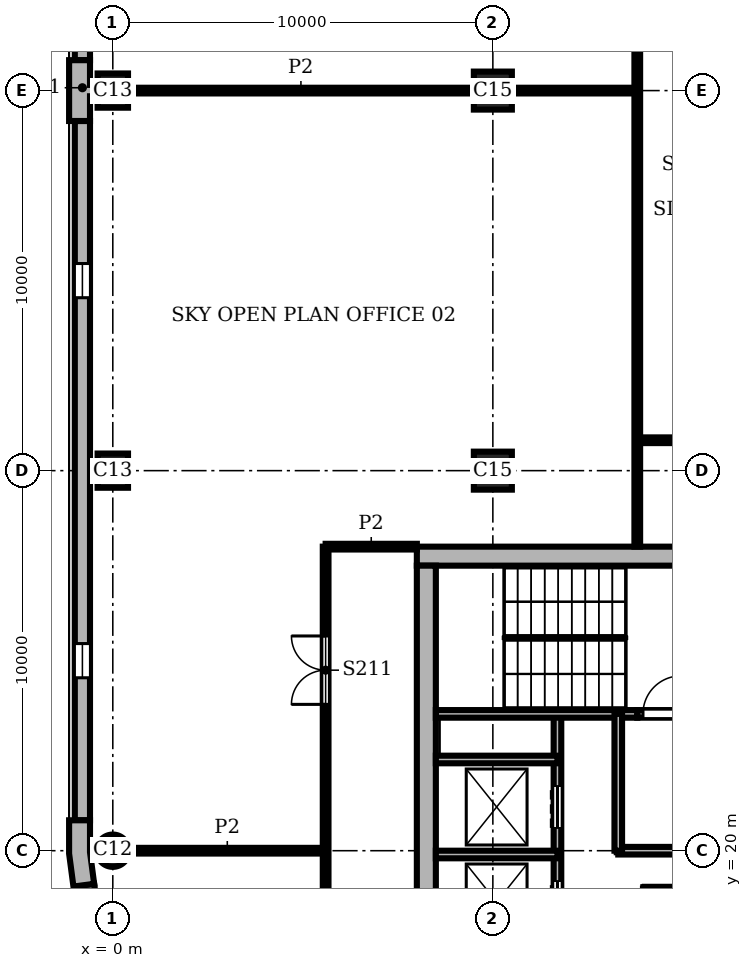
"""IFC4 building model, lengths in metres.
Left out: names, types, materials, properties, quantities, classifications, styles, units other than length and angle.
Written with IfcOpenShell. Run it as: python <this file> out.ifc"""

import sys

from ifc_helpers import new_model, si_unit, direction, frame, frame_2d, origin, origin_2d, place, context, subcontext, project, spatial, polyline, rectangle, circle, outline, extrude, element, fill, save


model = new_model("IFC4")
c1 = context("Model", 3, precision=1e-05, world=origin(), true_north=direction((0.0, 1.0)))
c2 = subcontext(c1, "Body", "Model", "MODEL_VIEW")
j1 = project(units=[si_unit("LENGTHUNIT", "METRE"), si_unit("PLANEANGLEUNIT", "RADIAN")], contexts=[c1])
p1 = place(None, origin())
s1 = spatial("IfcSite", under=j1, at=p1, CompositionType="ELEMENT")
p2 = place(p1, origin())
s2 = spatial("IfcBuilding", under=s1, at=p2, CompositionType="ELEMENT")
p3 = place(p2, frame((0.0, 0.0, 246.0)))
s3 = spatial("IfcBuildingStorey", under=s2, at=p3, CompositionType="ELEMENT", Elevation=246.0)
for number, where, z_axis, x_axis in (
    (1, (0.0, 40.0, 0.0), (0.0, 0.0, 1.0), (0.0, 1.0, 0.0)),
    (2, (0.0, 30.0, 0.0), (0.0, 0.0, 1.0), (0.0, 1.0, 0.0)),
):
    element("IfcColumn", number, at=place(p3, frame(where, z_axis=z_axis, x_axis=x_axis)), inside=s3, PredefinedType="COLUMN", context=c2, shape_type="SweptSolid", body=[
        extrude(rectangle(XDim=0.9, YDim=0.8, at=origin_2d()), origin(), (0.0, 0.0, 1.0), 5.4),
    ])
p4 = place(p3, frame((0.0, 20.0, 0.0), z_axis=(0.0, 0.0, 1.0), x_axis=(1.0, 0.0, 0.0)))
e3 = element("IfcColumn", 3, at=p4, inside=s3, PredefinedType="COLUMN", context=c2, shape_type="SweptSolid", body=[
    extrude(circle(Radius=0.425, at=origin_2d()), origin(), (0.0, 0.0, 1.0), 5.4),
])
for number, where, z_axis, x_axis in (
    (4, (10.0, 30.0, 0.0), (0.0, 0.0, 1.0), (1.0, 0.0, 0.0)),
    (5, (10.0, 40.0, 0.0), (0.0, 0.0, 1.0), (1.0, 0.0, 0.0)),
):
    element("IfcColumn", number, at=place(p3, frame(where, z_axis=z_axis, x_axis=x_axis)), inside=s3, PredefinedType="COLUMN", context=c2, shape_type="SweptSolid", body=[
        extrude(rectangle(XDim=1.0, YDim=1.0, at=origin_2d()), origin(), (0.0, 0.0, 1.0), 5.4),
    ])
p5 = place(p3, frame((28.0, 27.75, 0.0), z_axis=(0.0, 0.0, 1.0), x_axis=(-1.0, 0.0, 0.0)))
e6 = element("IfcWall", 6, at=p5, inside=s3, PredefinedType="SHEAR", context=c2, shape_type="SweptSolid", body=[
    extrude(rectangle(XDim=20.0, YDim=0.5, at=frame_2d((10.0, 0.0))), origin(), (0.0, 0.0, 1.0), 5.4),
])
p6 = place(p3, frame((8.25, 27.5, 0.0), z_axis=(0.0, 0.0, 1.0), x_axis=(0.0, -1.0, 0.0)))
e7 = element("IfcWall", 7, at=p6, inside=s3, PredefinedType="SHEAR", context=c2, shape_type="SweptSolid", body=[
    extrude(rectangle(XDim=19.0, YDim=0.5, at=frame_2d((9.5, 0.0))), origin(), (0.0, 0.0, 1.0), 5.4),
])
p7 = place(p3, origin())
e8 = element("IfcWall", 8, at=p7, inside=s3, PredefinedType="SOLIDWALL", context=c2, shape_type="SweptSolid", body=[
    extrude(outline(polyline([(-0.6, 39.2), (-0.6, 39.85), (-0.45, 39.85), (-0.45, 40.15), (-0.6, 40.15), (-0.6, 40.8), (-1.0, 40.8), (-1.15, 40.8), (-1.15, 40.0), (-1.15, 39.2), (-1.0, 39.2), (-0.6, 39.2)])), origin(), (0.0, 0.0, 1.0), 5.4),
])
e9 = element("IfcWall", 9, at=p7, inside=s3, PredefinedType="SOLIDWALL", context=c2, shape_type="SweptSolid", body=[
    extrude(outline(polyline([(-1.0, 20.8), (-1.15, 20.8), (-1.15, 19.925), (-1.036, 19.057), (-0.887, 19.076), (-0.49, 19.128), (-0.6, 19.961), (-0.6, 20.8), (-1.0, 20.8)])), origin(), (0.0, 0.0, 1.0), 5.4),
])
p8 = place(p3, frame((-0.8, 59.2, 0.0), z_axis=(0.0, 0.0, 1.0), x_axis=(0.0, -1.0, 0.0)))
e10 = element("IfcWall", 10, at=p8, inside=s3, PredefinedType="SOLIDWALL", context=c2, shape_type="SweptSolid", body=[
    extrude(rectangle(XDim=18.4, YDim=0.4, at=frame_2d((9.2, 0.0))), origin(), (0.0, 0.0, 1.0), 5.4),
])
p9 = place(p8, frame((3.75, 0.0, 0.9)))
e11 = element("IfcOpeningElement", 11, at=p9, cuts=e10, PredefinedType="OPENING", context=c2, shape_type="SweptSolid", body=[
    extrude(rectangle(XDim=0.9, YDim=3.4, at=frame_2d((0.45, 1.7))), frame((0.0, 0.21, 0.0), z_axis=(0.0, -1.0, 0.0), x_axis=(1.0, 0.0, 0.0)), (0.0, 0.0, 1.0), 0.42),
])
p10 = place(p8, frame((13.75, 0.0, 0.9)))
e12 = element("IfcOpeningElement", 12, at=p10, cuts=e10, PredefinedType="OPENING", context=c2, shape_type="SweptSolid", body=[
    extrude(rectangle(XDim=0.9, YDim=3.4, at=frame_2d((0.45, 1.7))), frame((0.0, 0.21, 0.0), z_axis=(0.0, -1.0, 0.0), x_axis=(1.0, 0.0, 0.0)), (0.0, 0.0, 1.0), 0.42),
])
p11 = place(p3, frame((-0.8, 39.2, 0.0), z_axis=(0.0, 0.0, 1.0), x_axis=(0.0, -1.0, 0.0)))
e13 = element("IfcWall", 13, at=p11, inside=s3, PredefinedType="SOLIDWALL", context=c2, shape_type="SweptSolid", body=[
    extrude(rectangle(XDim=18.4, YDim=0.4, at=frame_2d((9.2, 0.0))), origin(), (0.0, 0.0, 1.0), 5.4),
])
p12 = place(p11, frame((3.75, 0.0, 0.9)))
e14 = element("IfcOpeningElement", 14, at=p12, cuts=e13, PredefinedType="OPENING", context=c2, shape_type="SweptSolid", body=[
    extrude(rectangle(XDim=0.9, YDim=3.4, at=frame_2d((0.45, 1.7))), frame((0.0, 0.21, 0.0), z_axis=(0.0, -1.0, 0.0), x_axis=(1.0, 0.0, 0.0)), (0.0, 0.0, 1.0), 0.42),
])
p13 = place(p11, frame((13.75, 0.0, 0.9)))
e15 = element("IfcOpeningElement", 15, at=p13, cuts=e13, PredefinedType="OPENING", context=c2, shape_type="SweptSolid", body=[
    extrude(rectangle(XDim=0.9, YDim=3.4, at=frame_2d((0.45, 1.7))), frame((0.0, 0.21, 0.0), z_axis=(0.0, -1.0, 0.0), x_axis=(1.0, 0.0, 0.0)), (0.0, 0.0, 1.0), 0.42),
])
p14 = place(p3, frame((-0.689, 19.102, 0.0), z_axis=(0.0, 0.0, 1.0), x_axis=(0.130514280502, -0.991446429508, 0.0)))
e16 = element("IfcWall", 16, at=p14, inside=s3, PredefinedType="SOLIDWALL", context=c2, shape_type="SweptSolid", body=[
    extrude(rectangle(XDim=4.121, YDim=0.4, at=frame_2d((2.061, 0.0))), origin(), (0.0, 0.0, 1.0), 5.4),
])
p15 = place(p14, frame((1.611, 0.0, 0.9)))
e17 = element("IfcOpeningElement", 17, at=p15, cuts=e16, PredefinedType="OPENING", context=c2, shape_type="SweptSolid", body=[
    extrude(rectangle(XDim=0.9, YDim=3.4, at=frame_2d((0.45, 1.7))), frame((0.0, 0.21, 0.0), z_axis=(0.0, -1.0, 0.0), x_axis=(1.0, 0.0, 0.0)), (0.0, 0.0, 1.0), 0.42),
])
p16 = place(p3, frame((14.0, 19.0, 0.0), z_axis=(0.0, 0.0, 1.0), x_axis=(1.0, 0.0, 0.0)))
e18 = element("IfcWall", 18, at=p16, inside=s3, PredefinedType="PARTITIONING", context=c2, shape_type="SweptSolid", body=[
    extrude(rectangle(XDim=8.0, YDim=0.1, at=frame_2d((4.0, 0.0))), origin(), (0.0, 0.0, 1.0), 5.08),
])
p17 = place(p16, frame((5.45, 0.0, 0.0)))
e19 = element("IfcOpeningElement", 19, at=p17, cuts=e18, PredefinedType="OPENING", context=c2, shape_type="SweptSolid", body=[
    extrude(rectangle(XDim=1.1, YDim=2.1, at=frame_2d((0.55, 1.05))), frame((0.0, 0.06, 0.0), z_axis=(0.0, -1.0, 0.0), x_axis=(1.0, 0.0, 0.0)), (0.0, 0.0, 1.0), 0.12),
])
p18 = place(p3, frame((8.5, 19.9, 0.0), z_axis=(0.0, 0.0, 1.0), x_axis=(1.0, 0.0, 0.0)))
e20 = element("IfcWall", 20, at=p18, inside=s3, PredefinedType="SHEAR", context=c2, shape_type="SweptSolid", body=[
    extrude(rectangle(XDim=3.2, YDim=0.2, at=frame_2d((1.6, 0.0))), origin(), (0.0, 0.0, 1.0), 5.08),
])
p19 = place(p3, frame((13.3, 20.0, 0.0), z_axis=(0.0, 0.0, 1.0), x_axis=(1.0, 0.0, 0.0)))
e21 = element("IfcWall", 21, at=p19, inside=s3, PredefinedType="SHEAR", context=c2, shape_type="SweptSolid", body=[
    extrude(rectangle(XDim=4.7, YDim=0.2, at=frame_2d((2.35, 0.0))), origin(), (0.0, 0.0, 1.0), 5.08),
])
p20 = place(p3, frame((8.5, 22.4, 0.0), z_axis=(0.0, 0.0, 1.0), x_axis=(1.0, 0.0, 0.0)))
e22 = element("IfcWall", 22, at=p20, inside=s3, PredefinedType="SHEAR", context=c2, shape_type="SweptSolid", body=[
    extrude(rectangle(XDim=3.2, YDim=0.2, at=frame_2d((1.6, 0.0))), origin(), (0.0, 0.0, 1.0), 5.08),
])
p21 = place(p3, frame((8.5, 23.6, 0.0), z_axis=(0.0, 0.0, 1.0), x_axis=(1.0, 0.0, 0.0)))
e23 = element("IfcWall", 23, at=p21, inside=s3, PredefinedType="SHEAR", context=c2, shape_type="SweptSolid", body=[
    extrude(rectangle(XDim=5.3, YDim=0.2, at=frame_2d((2.65, 0.0))), origin(), (0.0, 0.0, 1.0), 5.08),
])
p22 = place(p3, frame((13.8, 23.6, 0.0), z_axis=(0.0, 0.0, 1.0), x_axis=(1.0, 0.0, 0.0)))
e24 = element("IfcWall", 24, at=p22, inside=s3, PredefinedType="SHEAR", context=c2, shape_type="SweptSolid", body=[
    extrude(rectangle(XDim=13.7, YDim=0.2, at=frame_2d((6.85, 0.0))), origin(), (0.0, 0.0, 1.0), 5.08),
])
p23 = place(p22, frame((2.4, 0.0, 0.0)))
e25 = element("IfcOpeningElement", 25, at=p23, cuts=e24, PredefinedType="OPENING", context=c2, shape_type="SweptSolid", body=[
    extrude(rectangle(XDim=1.1, YDim=2.1, at=frame_2d((0.55, 1.05))), frame((0.0, 0.11, 0.0), z_axis=(0.0, -1.0, 0.0), x_axis=(1.0, 0.0, 0.0)), (0.0, 0.0, 1.0), 0.22),
])
p24 = place(p22, frame((4.9, 0.0, 0.0)))
e26 = element("IfcOpeningElement", 26, at=p24, cuts=e24, PredefinedType="OPENING", context=c2, shape_type="SweptSolid", body=[
    extrude(rectangle(XDim=1.1, YDim=2.1, at=frame_2d((0.55, 1.05))), frame((0.0, 0.11, 0.0), z_axis=(0.0, -1.0, 0.0), x_axis=(1.0, 0.0, 0.0)), (0.0, 0.0, 1.0), 0.22),
])
p25 = place(p22, frame((0.15, 0.0, 0.0)))
e27 = element("IfcOpeningElement", 27, at=p25, cuts=e24, PredefinedType="OPENING", context=c2, shape_type="SweptSolid", body=[
    extrude(rectangle(XDim=1.0, YDim=2.1, at=frame_2d((0.5, 1.05))), frame((0.0, 0.11, 0.0), z_axis=(0.0, -1.0, 0.0), x_axis=(1.0, 0.0, 0.0)), (0.0, 0.0, 1.0), 0.22),
])
p26 = place(p3, frame((11.7, 12.4, 0.0), z_axis=(0.0, 0.0, 1.0), x_axis=(0.0, 1.0, 0.0)))
e28 = element("IfcWall", 28, at=p26, inside=s3, PredefinedType="SHEAR", context=c2, shape_type="SweptSolid", body=[
    extrude(rectangle(XDim=11.2, YDim=0.2, at=frame_2d((5.6, 0.0))), origin(), (0.0, 0.0, 1.0), 5.08),
])
p27 = place(p26, frame((0.7, 0.0, 0.0)))
e29 = element("IfcOpeningElement", 29, at=p27, cuts=e28, PredefinedType="OPENING", context=c2, shape_type="SweptSolid", body=[
    extrude(rectangle(XDim=1.1, YDim=2.1, at=frame_2d((0.55, 1.05))), frame((0.0, 0.11, 0.0), z_axis=(0.0, -1.0, 0.0), x_axis=(1.0, 0.0, 0.0)), (0.0, 0.0, 1.0), 0.22),
])
p28 = place(p26, frame((3.2, 0.0, 0.0)))
e30 = element("IfcOpeningElement", 30, at=p28, cuts=e28, PredefinedType="OPENING", context=c2, shape_type="SweptSolid", body=[
    extrude(rectangle(XDim=1.1, YDim=2.1, at=frame_2d((0.55, 1.05))), frame((0.0, 0.11, 0.0), z_axis=(0.0, -1.0, 0.0), x_axis=(1.0, 0.0, 0.0)), (0.0, 0.0, 1.0), 0.22),
])
p29 = place(p26, frame((5.7, 0.0, 0.0)))
e31 = element("IfcOpeningElement", 31, at=p29, cuts=e28, PredefinedType="OPENING", context=c2, shape_type="SweptSolid", body=[
    extrude(rectangle(XDim=1.1, YDim=2.1, at=frame_2d((0.55, 1.05))), frame((0.0, 0.11, 0.0), z_axis=(0.0, -1.0, 0.0), x_axis=(1.0, 0.0, 0.0)), (0.0, 0.0, 1.0), 0.22),
])
p30 = place(p26, frame((8.2, 0.0, 0.0)))
e32 = element("IfcOpeningElement", 32, at=p30, cuts=e28, PredefinedType="OPENING", context=c2, shape_type="SweptSolid", body=[
    extrude(rectangle(XDim=1.1, YDim=2.1, at=frame_2d((0.55, 1.05))), frame((0.0, 0.11, 0.0), z_axis=(0.0, -1.0, 0.0), x_axis=(1.0, 0.0, 0.0)), (0.0, 0.0, 1.0), 0.22),
])
p31 = place(p3, frame((13.3, 20.0, 0.0), z_axis=(0.0, 0.0, 1.0), x_axis=(0.0, 1.0, 0.0)))
e33 = element("IfcWall", 33, at=p31, inside=s3, PredefinedType="SHEAR", context=c2, shape_type="SweptSolid", body=[
    extrude(rectangle(XDim=3.6, YDim=0.2, at=frame_2d((1.8, 0.0))), origin(), (0.0, 0.0, 1.0), 5.08),
])
p32 = place(p3, frame((5.6, 5.6, 0.0), z_axis=(0.0, 0.0, 1.0), x_axis=(0.0, 1.0, 0.0)))
e34 = element("IfcWall", 34, at=p32, inside=s3, PredefinedType="PARTITIONING", context=c2, shape_type="SweptSolid", body=[
    extrude(rectangle(XDim=22.4, YDim=0.15, at=frame_2d((11.2, 0.0))), origin(), (0.0, 0.0, 1.0), 5.08),
])
p33 = place(p32, frame((5.35, 0.0, 0.0)))
e35 = element("IfcOpeningElement", 35, at=p33, cuts=e34, PredefinedType="OPENING", context=c2, shape_type="SweptSolid", body=[
    extrude(rectangle(XDim=1.0, YDim=2.1, at=frame_2d((0.5, 1.05))), frame((0.0, 0.085, 0.0), z_axis=(0.0, -1.0, 0.0), x_axis=(1.0, 0.0, 0.0)), (0.0, 0.0, 1.0), 0.17),
])
p34 = place(p32, frame((11.25, 0.0, 0.0)))
e36 = element("IfcOpeningElement", 36, at=p34, cuts=e34, PredefinedType="OPENING", context=c2, shape_type="SweptSolid", body=[
    extrude(rectangle(XDim=0.8, YDim=2.1, at=frame_2d((0.4, 1.05))), frame((0.0, 0.085, 0.0), z_axis=(0.0, -1.0, 0.0), x_axis=(1.0, 0.0, 0.0)), (0.0, 0.0, 1.0), 0.17),
])
p35 = place(p32, frame((18.25, 0.0, 0.0)))
e37 = element("IfcOpeningElement", 37, at=p35, cuts=e34, PredefinedType="OPENING", context=c2, shape_type="SweptSolid", body=[
    extrude(rectangle(XDim=1.8, YDim=2.1, at=frame_2d((0.9, 1.05))), frame((0.0, 0.085, 0.0), z_axis=(0.0, -1.0, 0.0), x_axis=(1.0, 0.0, 0.0)), (0.0, 0.0, 1.0), 0.17),
])
p36 = place(p3, frame((13.8, 28.0, 0.0), z_axis=(0.0, 0.0, 1.0), x_axis=(0.0, 1.0, 0.0)))
e38 = element("IfcWall", 38, at=p36, inside=s3, PredefinedType="PARTITIONING", context=c2, shape_type="SweptSolid", body=[
    extrude(rectangle(XDim=29.6, YDim=0.15, at=frame_2d((14.8, 0.0))), origin(), (0.0, 0.0, 1.0), 5.08),
])
p37 = place(p36, frame((20.351, 0.0, 0.0)))
e39 = element("IfcOpeningElement", 39, at=p37, cuts=e38, PredefinedType="OPENING", context=c2, shape_type="SweptSolid", body=[
    extrude(rectangle(XDim=1.8, YDim=2.1, at=frame_2d((0.9, 1.05))), frame((0.0, 0.085, 0.0), z_axis=(0.0, -1.0, 0.0), x_axis=(1.0, 0.0, 0.0)), (0.0, 0.0, 1.0), 0.17),
])
p38 = place(p3, frame((0.425, 20.0, 0.0), z_axis=(0.0, 0.0, 1.0), x_axis=(1.0, 0.0, 0.0)))
e40 = element("IfcWall", 40, at=p38, inside=s3, PredefinedType="PARTITIONING", context=c2, shape_type="SweptSolid", body=[
    extrude(rectangle(XDim=5.175, YDim=0.15, at=frame_2d((2.587, 0.0))), origin(), (0.0, 0.0, 1.0), 5.08),
])
p39 = place(p3, frame((5.6, 28.0, 0.0), z_axis=(0.0, 0.0, 1.0), x_axis=(1.0, 0.0, 0.0)))
e41 = element("IfcWall", 41, at=p39, inside=s3, PredefinedType="PARTITIONING", context=c2, shape_type="SweptSolid", body=[
    extrude(rectangle(XDim=2.4, YDim=0.15, at=frame_2d((1.2, 0.0))), origin(), (0.0, 0.0, 1.0), 5.08),
])
p40 = place(p3, frame((13.802, 30.8, 0.0), z_axis=(0.0, 0.0, 1.0), x_axis=(1.0, 0.0, 0.0)))
e42 = element("IfcWall", 42, at=p40, inside=s3, PredefinedType="PARTITIONING", context=c2, shape_type="SweptSolid", body=[
    extrude(rectangle(XDim=16.798, YDim=0.15, at=frame_2d((8.399, 0.0))), origin(), (0.0, 0.0, 1.0), 5.08),
])
p41 = place(p40, frame((4.6, 0.0, 0.0)))
e43 = element("IfcOpeningElement", 43, at=p41, cuts=e42, PredefinedType="OPENING", context=c2, shape_type="SweptSolid", body=[
    extrude(rectangle(XDim=1.0, YDim=2.1, at=frame_2d((0.5, 1.05))), frame((0.0, 0.085, 0.0), z_axis=(0.0, -1.0, 0.0), x_axis=(1.0, 0.0, 0.0)), (0.0, 0.0, 1.0), 0.17),
])
p42 = place(p3, frame((0.4, 40.0, 0.0), z_axis=(0.0, 0.0, 1.0), x_axis=(1.0, 0.0, 0.0)))
e44 = element("IfcWall", 44, at=p42, inside=s3, PredefinedType="PARTITIONING", context=c2, shape_type="SweptSolid", body=[
    extrude(rectangle(XDim=9.1, YDim=0.15, at=frame_2d((4.55, 0.0))), origin(), (0.0, 0.0, 1.0), 5.08),
])
p43 = place(p3, frame((10.5, 40.0, 0.0), z_axis=(0.0, 0.0, 1.0), x_axis=(1.0, 0.0, 0.0)))
e45 = element("IfcWall", 45, at=p43, inside=s3, PredefinedType="PARTITIONING", context=c2, shape_type="SweptSolid", body=[
    extrude(rectangle(XDim=3.3, YDim=0.15, at=frame_2d((1.65, 0.0))), origin(), (0.0, 0.0, 1.0), 5.08),
])
p44 = place(p12, origin())
e46 = element("IfcWindow", 46, at=p44, inside=s3, PartitioningType="SINGLE_PANEL", PredefinedType="WINDOW", context=c2, shape_type="SweptSolid", body=[
    extrude(rectangle(XDim=0.9, YDim=3.4, at=frame_2d((0.45, 1.7))), frame((0.0, 0.16, 0.0), z_axis=(0.0, -1.0, 0.0), x_axis=(1.0, 0.0, 0.0)), (0.0, 0.0, 1.0), 0.06),
])
fill(e14, e46)
p45 = place(p13, origin())
e47 = element("IfcWindow", 47, at=p45, inside=s3, PartitioningType="SINGLE_PANEL", PredefinedType="WINDOW", context=c2, shape_type="SweptSolid", body=[
    extrude(rectangle(XDim=0.9, YDim=3.4, at=frame_2d((0.45, 1.7))), frame((0.0, 0.16, 0.0), z_axis=(0.0, -1.0, 0.0), x_axis=(1.0, 0.0, 0.0)), (0.0, 0.0, 1.0), 0.06),
])
fill(e15, e47)
p46 = place(p29, origin())
e48 = element("IfcDoor", 48, at=p46, inside=s3, OperationType="DOUBLE_DOOR_SLIDING", PredefinedType="DOOR", context=c2, shape_type="SweptSolid", body=[
    extrude(rectangle(XDim=1.1, YDim=2.1, at=frame_2d((0.55, 1.05))), frame((0.0, 0.025, 0.0), z_axis=(0.0, -1.0, 0.0), x_axis=(1.0, 0.0, 0.0)), (0.0, 0.0, 1.0), 0.05),
])
fill(e31, e48)
p47 = place(p30, origin())
e49 = element("IfcDoor", 49, at=p47, inside=s3, OperationType="DOUBLE_DOOR_SLIDING", PredefinedType="DOOR", context=c2, shape_type="SweptSolid", body=[
    extrude(rectangle(XDim=1.1, YDim=2.1, at=frame_2d((0.55, 1.05))), frame((0.0, 0.025, 0.0), z_axis=(0.0, -1.0, 0.0), x_axis=(1.0, 0.0, 0.0)), (0.0, 0.0, 1.0), 0.05),
])
fill(e32, e49)
p48 = place(p25, origin())
e50 = element("IfcDoor", 50, at=p48, inside=s3, OperationType="SINGLE_SWING_RIGHT", PredefinedType="DOOR", context=c2, shape_type="SweptSolid", body=[
    extrude(rectangle(XDim=1.0, YDim=2.1, at=frame_2d((0.5, 1.05))), frame((0.0, 0.025, 0.0), z_axis=(0.0, -1.0, 0.0), x_axis=(1.0, 0.0, 0.0)), (0.0, 0.0, 1.0), 0.05),
])
fill(e27, e50)
p49 = place(p35, origin())
e51 = element("IfcDoor", 51, at=p49, inside=s3, OperationType="DOUBLE_DOOR_SINGLE_SWING", PredefinedType="DOOR", context=c2, shape_type="SweptSolid", body=[
    extrude(rectangle(XDim=1.8, YDim=2.1, at=frame_2d((0.9, 1.05))), frame((0.0, 0.025, 0.0), z_axis=(0.0, -1.0, 0.0), x_axis=(1.0, 0.0, 0.0)), (0.0, 0.0, 1.0), 0.05),
])
fill(e37, e51)
save(model, sys.argv[1])
